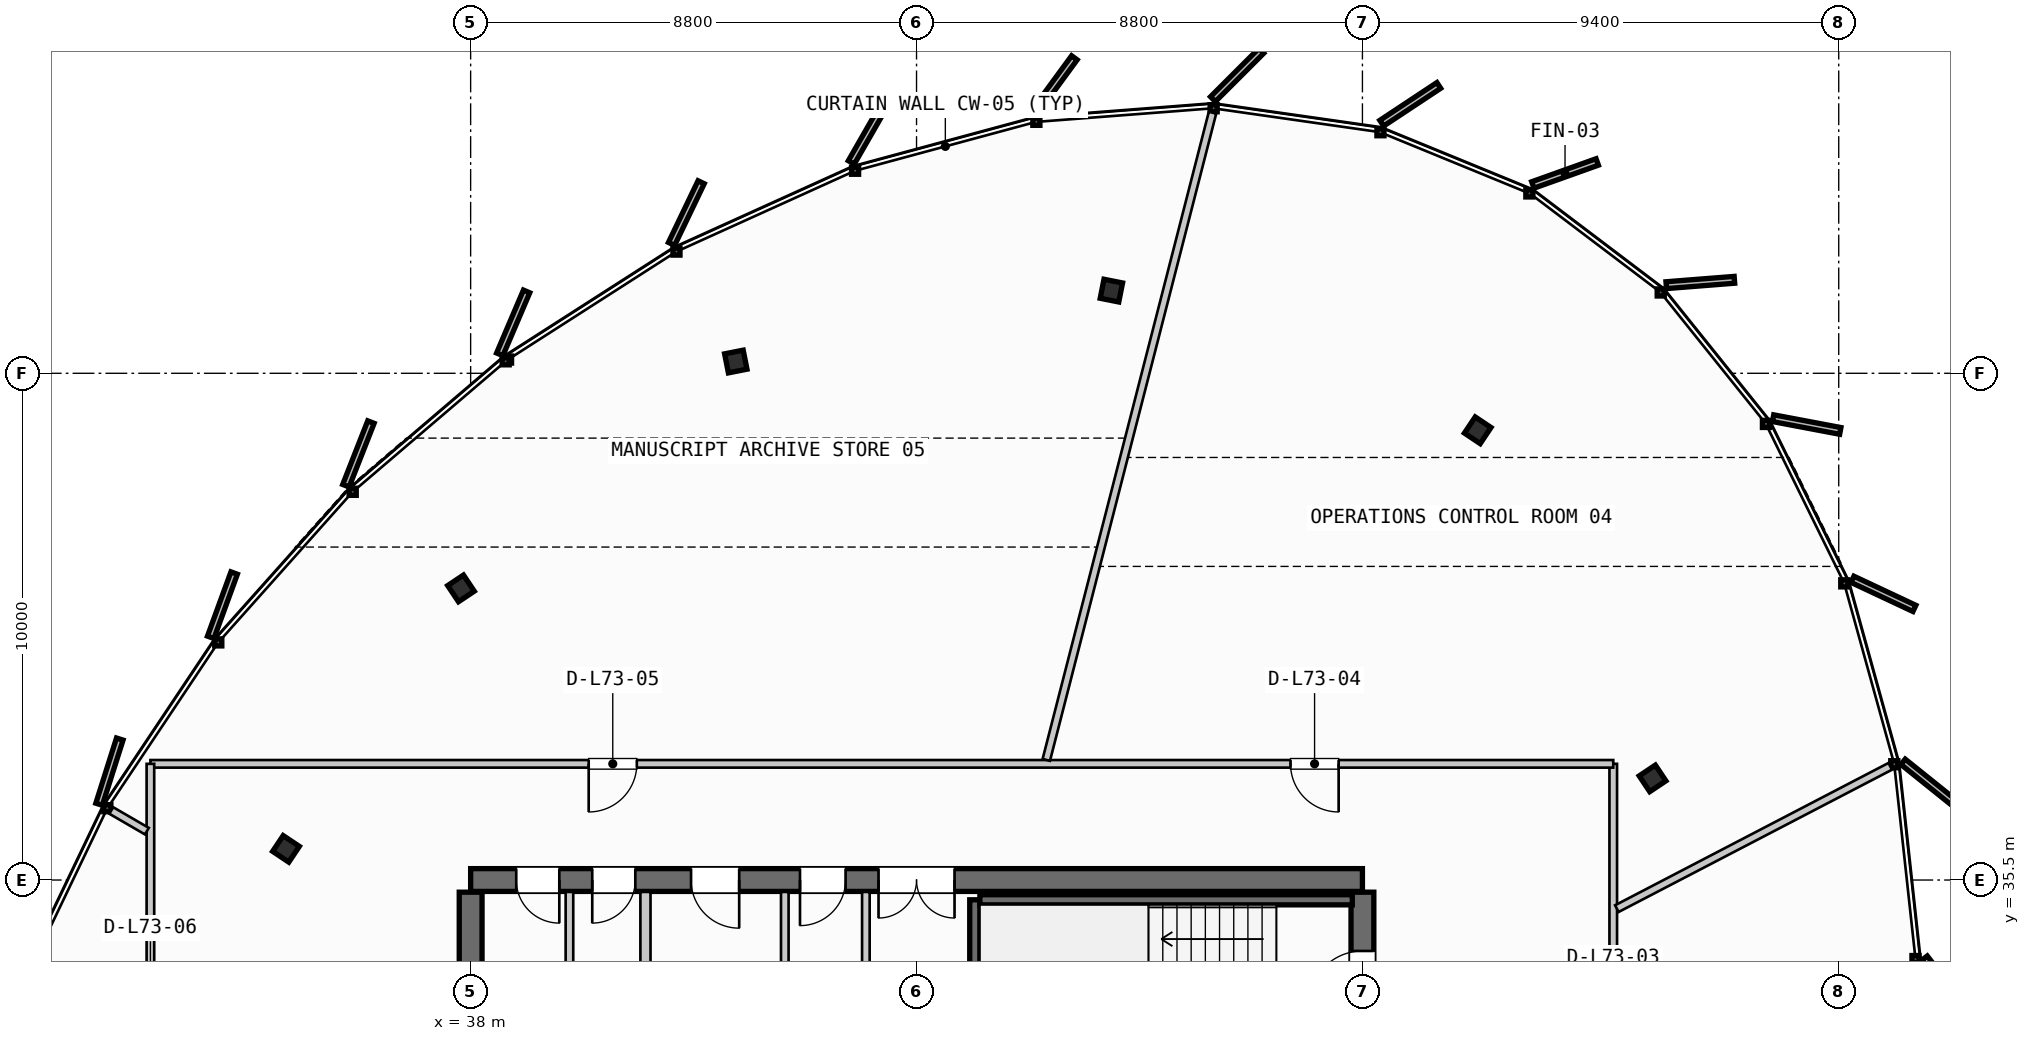
"""IFC4 building model, lengths in metres.
Left out: names, types, materials, properties, quantities, classifications, styles, units other than length and angle.
Written with IfcOpenShell. Run it as: python <this file> out.ifc"""

import sys

from ifc_helpers import new_model, si_unit, direction, frame, frame_2d, origin, origin_2d, place, context, subcontext, project, spatial, rectangle, i_section, extrude, source, transform, mapped, element, fill, save


model = new_model("IFC4")
c1 = context("Model", 3, precision=1e-05, world=origin(), true_north=direction((0.0, 1.0)))
c2 = subcontext(c1, "Body", "Model", "MODEL_VIEW")
j1 = project(units=[si_unit("LENGTHUNIT", "METRE"), si_unit("PLANEANGLEUNIT", "RADIAN")], contexts=[c1])
p1 = place(None, origin())
s1 = spatial("IfcSite", under=j1, at=p1, CompositionType="ELEMENT")
p2 = place(p1, origin())
s2 = spatial("IfcBuilding", under=s1, at=p2, CompositionType="ELEMENT")
p3 = place(p2, frame((0.0, 0.0, 276.7)))
s3 = spatial("IfcBuildingStorey", under=s2, at=p3, CompositionType="ELEMENT", Elevation=276.7)
p4 = place(p3, frame((55.6, 35.5, 0.0), z_axis=(0.0, 0.0, 1.0), x_axis=(-1.0, 0.0, 0.0)))
e1 = element("IfcWall", 1, at=p4, inside=s3, PredefinedType="SHEAR", context=c2, shape_type="SweptSolid", body=[
    extrude(rectangle(XDim=17.6, YDim=0.45, at=frame_2d((8.8, 0.0))), origin(), (0.0, 0.0, 1.0), 3.21),
])
p5 = place(p4, frame((8.05, 0.0, 0.0)))
e2 = element("IfcOpeningElement", 2, at=p5, cuts=e1, PredefinedType="OPENING", context=c2, shape_type="SweptSolid", body=[
    extrude(rectangle(XDim=1.5, YDim=2.2, at=frame_2d((0.75, 1.1))), frame((0.0, 0.235, 0.0), z_axis=(0.0, -1.0, 0.0), x_axis=(1.0, 0.0, 0.0)), (0.0, 0.0, 1.0), 0.47),
])
p6 = place(p4, frame((15.85, 0.0, 0.0)))
e3 = element("IfcOpeningElement", 3, at=p6, cuts=e1, PredefinedType="OPENING", context=c2, shape_type="SweptSolid", body=[
    extrude(rectangle(XDim=0.85, YDim=2.15, at=frame_2d((0.425, 1.075))), frame((0.0, 0.235, 0.0), z_axis=(0.0, -1.0, 0.0), x_axis=(1.0, 0.0, 0.0)), (0.0, 0.0, 1.0), 0.47),
])
p7 = place(p4, frame((14.35, 0.0, 0.0)))
e4 = element("IfcOpeningElement", 4, at=p7, cuts=e1, PredefinedType="OPENING", context=c2, shape_type="SweptSolid", body=[
    extrude(rectangle(XDim=0.85, YDim=2.15, at=frame_2d((0.425, 1.075))), frame((0.0, 0.235, 0.0), z_axis=(0.0, -1.0, 0.0), x_axis=(1.0, 0.0, 0.0)), (0.0, 0.0, 1.0), 0.47),
])
p8 = place(p4, frame((12.3, 0.0, 0.0)))
e5 = element("IfcOpeningElement", 5, at=p8, cuts=e1, PredefinedType="OPENING", context=c2, shape_type="SweptSolid", body=[
    extrude(rectangle(XDim=0.95, YDim=2.15, at=frame_2d((0.475, 1.075))), frame((0.0, 0.235, 0.0), z_axis=(0.0, -1.0, 0.0), x_axis=(1.0, 0.0, 0.0)), (0.0, 0.0, 1.0), 0.47),
])
p9 = place(p4, frame((10.2, 0.0, 0.0)))
e6 = element("IfcOpeningElement", 6, at=p9, cuts=e1, PredefinedType="OPENING", context=c2, shape_type="SweptSolid", body=[
    extrude(rectangle(XDim=0.9, YDim=2.15, at=frame_2d((0.45, 1.075))), frame((0.0, 0.235, 0.0), z_axis=(0.0, -1.0, 0.0), x_axis=(1.0, 0.0, 0.0)), (0.0, 0.0, 1.0), 0.47),
])
p10 = place(p3, frame((38.0, 35.26, 0.0), z_axis=(0.0, 0.0, 1.0), x_axis=(0.0, -1.0, 0.0)))
e7 = element("IfcWall", 7, at=p10, inside=s3, PredefinedType="SHEAR", context=c2, shape_type="SweptSolid", body=[
    extrude(rectangle(XDim=14.92, YDim=0.45, at=frame_2d((7.46, 0.0))), origin(), (0.0, 0.0, 1.0), 3.21),
])
p11 = place(p10, frame((5.21, 0.0, 0.0)))
e8 = element("IfcOpeningElement", 8, at=p11, cuts=e7, PredefinedType="OPENING", context=c2, shape_type="SweptSolid", body=[
    extrude(rectangle(XDim=1.1, YDim=2.2, at=frame_2d((0.55, 1.1))), frame((0.0, 0.235, 0.0), z_axis=(0.0, -1.0, 0.0), x_axis=(1.0, 0.0, 0.0)), (0.0, 0.0, 1.0), 0.47),
])
p12 = place(p3, frame((55.6, 20.34, 0.0), z_axis=(0.0, 0.0, 1.0), x_axis=(0.0, 1.0, 0.0)))
e9 = element("IfcWall", 9, at=p12, inside=s3, PredefinedType="SHEAR", context=c2, shape_type="SweptSolid", body=[
    extrude(rectangle(XDim=14.92, YDim=0.45, at=frame_2d((7.46, 0.0))), origin(), (0.0, 0.0, 1.0), 3.21),
])
p13 = place(p12, frame((12.71, 0.0, 0.0)))
e10 = element("IfcOpeningElement", 10, at=p13, cuts=e9, PredefinedType="OPENING", context=c2, shape_type="SweptSolid", body=[
    extrude(rectangle(XDim=1.05, YDim=2.15, at=frame_2d((0.525, 1.075))), frame((0.0, 0.235, 0.0), z_axis=(0.0, -1.0, 0.0), x_axis=(1.0, 0.0, 0.0)), (0.0, 0.0, 1.0), 0.47),
])
p14 = place(p12, frame((8.61, 0.0, 0.0)))
e11 = element("IfcOpeningElement", 11, at=p14, cuts=e9, PredefinedType="OPENING", context=c2, shape_type="SweptSolid", body=[
    extrude(rectangle(XDim=1.1, YDim=2.2, at=frame_2d((0.55, 1.1))), frame((0.0, 0.235, 0.0), z_axis=(0.0, -1.0, 0.0), x_axis=(1.0, 0.0, 0.0)), (0.0, 0.0, 1.0), 0.47),
])
m1 = source(origin(), c2, "Body", "SweptSolid", [
    extrude(i_section(OverallWidth=0.374, OverallDepth=0.383, WebThickness=0.017, FlangeThickness=0.026, FilletRadius=0.015, at=origin_2d()), origin(), (0.0, 0.0, 1.0), 3.21),
])
for number, where, z_axis, x_axis in (
    (12, (61.326, 37.506, 0.0), (0.0, 0.0, 1.0), (0.831, 0.556, 0.0)),
    (13, (57.875, 44.375, 0.0), (0.0, 0.0, 1.0), (0.556, 0.831, 0.0)),
    (14, (50.645, 47.132, 0.0), (0.0, 0.0, 1.0), (0.195, 0.981, 0.0)),
    (15, (43.233, 45.732, 0.0), (0.0, 0.0, 1.0), (-0.195, 0.981, 0.0)),
    (16, (37.81, 41.255, 0.0), (0.0, 0.0, 1.0), (-0.556, 0.831, 0.0)),
    (17, (34.356, 36.115, 0.0), (0.0, 0.0, 1.0), (-0.831, 0.556, 0.0)),
):
    element("IfcColumn", number, at=place(p3, frame(where, z_axis=z_axis, x_axis=x_axis)), inside=s3, PredefinedType="COLUMN", context=c2, shape_type="MappedRepresentation", body=[
        mapped(m1, transform((0.0, 0.0, 0.0), scale=1.0)),
    ])
p15 = place(p3, frame((47.95, 32.05, 0.0), z_axis=(0.0, 0.0, 1.0), x_axis=(0.0, 1.0, 0.0)))
e18 = element("IfcWall", 18, at=p15, inside=s3, PredefinedType="SHEAR", context=c2, shape_type="SweptSolid", body=[
    extrude(rectangle(XDim=3.06, YDim=0.2, at=frame_2d((1.53, 0.0))), origin(), (0.0, 0.0, 1.0), 3.21),
])
p16 = place(p3, frame((48.05, 35.11, 0.0), z_axis=(0.0, 0.0, 1.0), x_axis=(1.0, 0.0, 0.0)))
e19 = element("IfcWall", 19, at=p16, inside=s3, PredefinedType="SHEAR", context=c2, shape_type="SweptSolid", body=[
    extrude(rectangle(XDim=7.35, YDim=0.2, at=frame_2d((3.675, 0.0))), origin(), (0.0, 0.0, 1.0), 3.21),
])
p17 = place(p3, frame((41.45, 31.85, 0.0), z_axis=(0.0, 0.0, 1.0), x_axis=(0.0, 1.0, 0.0)))
e20 = element("IfcWall", 20, at=p17, inside=s3, PredefinedType="PARTITIONING", context=c2, shape_type="SweptSolid", body=[
    extrude(rectangle(XDim=3.415, YDim=0.2, at=frame_2d((1.708, 0.0))), origin(), (0.0, 0.0, 1.0), 2.455),
])
for number, where, z_axis, x_axis in (
    (21, (45.8, 31.85, 0.0), (0.0, 0.0, 1.0), (0.0, 1.0, 0.0)),
    (22, (39.95, 31.85, 0.0), (0.0, 0.0, 1.0), (0.0, 1.0, 0.0)),
):
    element("IfcWall", number, at=place(p3, frame(where, z_axis=z_axis, x_axis=x_axis)), inside=s3, PredefinedType="PARTITIONING", context=c2, shape_type="SweptSolid", body=[
        extrude(rectangle(XDim=3.415, YDim=0.15, at=frame_2d((1.708, 0.0))), origin(), (0.0, 0.0, 1.0), 2.455),
    ])
p18 = place(p3, frame((44.2, 31.85, 0.0), z_axis=(0.0, 0.0, 1.0), x_axis=(0.0, 1.0, 0.0)))
e23 = element("IfcWall", 23, at=p18, inside=s3, PredefinedType="PLUMBINGWALL", context=c2, shape_type="SweptSolid", body=[
    extrude(rectangle(XDim=3.415, YDim=0.15, at=frame_2d((1.708, 0.0))), origin(), (0.0, 0.0, 1.0), 2.455),
])
p19 = place(p3, frame((60.55, 17.807, 0.0), z_axis=(0.0, 0.0, 1.0), x_axis=(0.0, 1.0, 0.0)))
e24 = element("IfcWall", 24, at=p19, inside=s3, PredefinedType="PARTITIONING", context=c2, shape_type="SweptSolid", body=[
    extrude(rectangle(XDim=19.986, YDim=0.15, at=frame_2d((9.993, 0.0))), origin(), (0.0, 0.0, 1.0), 2.455),
])
p20 = place(p19, frame((4.164, 0.0, 0.0)))
e25 = element("IfcOpeningElement", 25, at=p20, cuts=e24, PredefinedType="OPENING", context=c2, shape_type="SweptSolid", body=[
    extrude(rectangle(XDim=0.95, YDim=2.15, at=frame_2d((0.475, 1.075))), frame((0.0, 0.085, 0.0), z_axis=(0.0, -1.0, 0.0), x_axis=(1.0, 0.0, 0.0)), (0.0, 0.0, 1.0), 0.17),
])
p21 = place(p19, frame((14.036, 0.0, 0.0)))
e26 = element("IfcOpeningElement", 26, at=p21, cuts=e24, PredefinedType="OPENING", context=c2, shape_type="SweptSolid", body=[
    extrude(rectangle(XDim=0.95, YDim=2.15, at=frame_2d((0.475, 1.075))), frame((0.0, 0.085, 0.0), z_axis=(0.0, -1.0, 0.0), x_axis=(1.0, 0.0, 0.0)), (0.0, 0.0, 1.0), 0.17),
])
p22 = place(p3, frame((60.55, 37.793, 0.0), z_axis=(0.0, 0.0, 1.0), x_axis=(-1.0, 0.0, 0.0)))
e27 = element("IfcWall", 27, at=p22, inside=s3, PredefinedType="PARTITIONING", context=c2, shape_type="SweptSolid", body=[
    extrude(rectangle(XDim=28.87, YDim=0.15, at=frame_2d((14.435, 0.0))), origin(), (0.0, 0.0, 1.0), 2.455),
])
p23 = place(p22, frame((5.419, 0.0, 0.0)))
e28 = element("IfcOpeningElement", 28, at=p23, cuts=e27, PredefinedType="OPENING", context=c2, shape_type="SweptSolid", body=[
    extrude(rectangle(XDim=0.95, YDim=2.15, at=frame_2d((0.475, 1.075))), frame((0.0, 0.085, 0.0), z_axis=(0.0, -1.0, 0.0), x_axis=(1.0, 0.0, 0.0)), (0.0, 0.0, 1.0), 0.17),
])
p24 = place(p22, frame((19.27, 0.0, 0.0)))
e29 = element("IfcOpeningElement", 29, at=p24, cuts=e27, PredefinedType="OPENING", context=c2, shape_type="SweptSolid", body=[
    extrude(rectangle(XDim=0.95, YDim=2.15, at=frame_2d((0.475, 1.075))), frame((0.0, 0.085, 0.0), z_axis=(0.0, -1.0, 0.0), x_axis=(1.0, 0.0, 0.0)), (0.0, 0.0, 1.0), 0.17),
])
p25 = place(p3, frame((31.68, 37.793, 0.0), z_axis=(0.0, 0.0, 1.0), x_axis=(0.0, -1.0, 0.0)))
e30 = element("IfcWall", 30, at=p25, inside=s3, PredefinedType="PARTITIONING", context=c2, shape_type="SweptSolid", body=[
    extrude(rectangle(XDim=19.986, YDim=0.15, at=frame_2d((9.993, 0.0))), origin(), (0.0, 0.0, 1.0), 2.455),
])
p26 = place(p25, frame((4.422, 0.0, 0.0)))
e31 = element("IfcOpeningElement", 31, at=p26, cuts=e30, PredefinedType="OPENING", context=c2, shape_type="SweptSolid", body=[
    extrude(rectangle(XDim=0.95, YDim=2.15, at=frame_2d((0.475, 1.075))), frame((0.0, 0.085, 0.0), z_axis=(0.0, -1.0, 0.0), x_axis=(1.0, 0.0, 0.0)), (0.0, 0.0, 1.0), 0.17),
])
p27 = place(p25, frame((14.421, 0.0, 0.0)))
e32 = element("IfcOpeningElement", 32, at=p27, cuts=e30, PredefinedType="OPENING", context=c2, shape_type="SweptSolid", body=[
    extrude(rectangle(XDim=0.95, YDim=2.15, at=frame_2d((0.475, 1.075))), frame((0.0, 0.085, 0.0), z_axis=(0.0, -1.0, 0.0), x_axis=(1.0, 0.0, 0.0)), (0.0, 0.0, 1.0), 0.17),
])
p28 = place(p3, frame((60.621, 34.936, 0.0), z_axis=(0.0, 0.0, 1.0), x_axis=(0.887068888944, 0.461637072025, 0.0)))
e33 = element("IfcWall", 33, at=p28, inside=s3, PredefinedType="PARTITIONING", context=c2, shape_type="SweptSolid", body=[
    extrude(rectangle(XDim=6.083, YDim=0.15, at=frame_2d((3.041, 0.0))), origin(), (0.0, 0.0, 1.0), 2.455),
])
p29 = place(p3, frame((49.361, 37.871, 0.0), z_axis=(0.0, 0.0, 1.0), x_axis=(0.248764179593, 0.968564083038, 0.0)))
e34 = element("IfcWall", 34, at=p29, inside=s3, PredefinedType="PARTITIONING", context=c2, shape_type="SweptSolid", body=[
    extrude(rectangle(XDim=13.187, YDim=0.15, at=frame_2d((6.594, 0.0))), origin(), (0.0, 0.0, 1.0), 2.455),
])
p30 = place(p3, frame((31.611, 36.464, 0.0), z_axis=(0.0, 0.0, 1.0), x_axis=(-0.865028583044, 0.501722583224, 0.0)))
e35 = element("IfcWall", 35, at=p30, inside=s3, PredefinedType="PARTITIONING", context=c2, shape_type="SweptSolid", body=[
    extrude(rectangle(XDim=0.813, YDim=0.15, at=frame_2d((0.407, 0.0))), origin(), (0.0, 0.0, 1.0), 2.455),
])
m2 = source(origin(), c2, "Body", "SweptSolid", [
    extrude(rectangle(XDim=1.05, YDim=2.15, at=frame_2d((0.525, 1.075))), frame((0.0, 0.025, 0.0), z_axis=(0.0, -1.0, 0.0), x_axis=(1.0, 0.0, 0.0)), (0.0, 0.0, 1.0), 0.05),
])
p31 = place(p13, origin())
e36 = element("IfcDoor", 36, at=p31, inside=s3, OperationType="SINGLE_SWING_LEFT", PredefinedType="DOOR", context=c2, shape_type="MappedRepresentation", body=[
    mapped(m2, transform((0.0, 0.0, 0.0), scale=1.0)),
])
fill(e10, e36)
m3 = source(origin(), c2, "Body", "SweptSolid", [
    extrude(rectangle(XDim=1.5, YDim=2.2, at=frame_2d((0.75, 1.1))), frame((0.0, 0.025, 0.0), z_axis=(0.0, -1.0, 0.0), x_axis=(1.0, 0.0, 0.0)), (0.0, 0.0, 1.0), 0.05),
])
p32 = place(p5, origin())
e37 = element("IfcDoor", 37, at=p32, inside=s3, OperationType="DOUBLE_DOOR_SINGLE_SWING", PredefinedType="DOOR", context=c2, shape_type="MappedRepresentation", body=[
    mapped(m3, transform((0.0, 0.0, 0.0), scale=1.0)),
])
fill(e2, e37)
m4 = source(origin(), c2, "Body", "SweptSolid", [
    extrude(rectangle(XDim=0.85, YDim=2.15, at=frame_2d((0.425, 1.075))), frame((0.0, 0.025, 0.0), z_axis=(0.0, -1.0, 0.0), x_axis=(1.0, 0.0, 0.0)), (0.0, 0.0, 1.0), 0.05),
])
p33 = place(p6, origin())
e38 = element("IfcDoor", 38, at=p33, inside=s3, OperationType="SINGLE_SWING_LEFT", PredefinedType="DOOR", context=c2, shape_type="MappedRepresentation", body=[
    mapped(m4, transform((0.0, 0.0, 0.0), scale=1.0)),
])
fill(e3, e38)
p34 = place(p7, origin())
e39 = element("IfcDoor", 39, at=p34, inside=s3, OperationType="SINGLE_SWING_RIGHT", PredefinedType="DOOR", context=c2, shape_type="MappedRepresentation", body=[
    mapped(m4, transform((0.0, 0.0, 0.0), scale=1.0)),
])
fill(e4, e39)
m5 = source(origin(), c2, "Body", "SweptSolid", [
    extrude(rectangle(XDim=0.95, YDim=2.15, at=frame_2d((0.475, 1.075))), frame((0.0, 0.025, 0.0), z_axis=(0.0, -1.0, 0.0), x_axis=(1.0, 0.0, 0.0)), (0.0, 0.0, 1.0), 0.05),
])
p35 = place(p8, origin())
e40 = element("IfcDoor", 40, at=p35, inside=s3, OperationType="SINGLE_SWING_LEFT", PredefinedType="DOOR", context=c2, shape_type="MappedRepresentation", body=[
    mapped(m5, transform((0.0, 0.0, 0.0), scale=1.0)),
])
fill(e5, e40)
m6 = source(origin(), c2, "Body", "SweptSolid", [
    extrude(rectangle(XDim=0.9, YDim=2.15, at=frame_2d((0.45, 1.075))), frame((0.0, 0.025, 0.0), z_axis=(0.0, -1.0, 0.0), x_axis=(1.0, 0.0, 0.0)), (0.0, 0.0, 1.0), 0.05),
])
p36 = place(p9, origin())
e41 = element("IfcDoor", 41, at=p36, inside=s3, OperationType="SINGLE_SWING_RIGHT", PredefinedType="DOOR", context=c2, shape_type="MappedRepresentation", body=[
    mapped(m6, transform((0.0, 0.0, 0.0), scale=1.0)),
])
fill(e6, e41)
p37 = place(p23, origin())
e42 = element("IfcDoor", 42, at=p37, inside=s3, OperationType="SINGLE_SWING_LEFT", PredefinedType="DOOR", context=c2, shape_type="MappedRepresentation", body=[
    mapped(m5, transform((0.0, 0.0, 0.0), scale=1.0)),
])
fill(e28, e42)
p38 = place(p24, origin())
e43 = element("IfcDoor", 43, at=p38, inside=s3, OperationType="SINGLE_SWING_RIGHT", PredefinedType="DOOR", context=c2, shape_type="MappedRepresentation", body=[
    mapped(m5, transform((0.0, 0.0, 0.0), scale=1.0)),
])
fill(e29, e43)
save(model, sys.argv[1])
